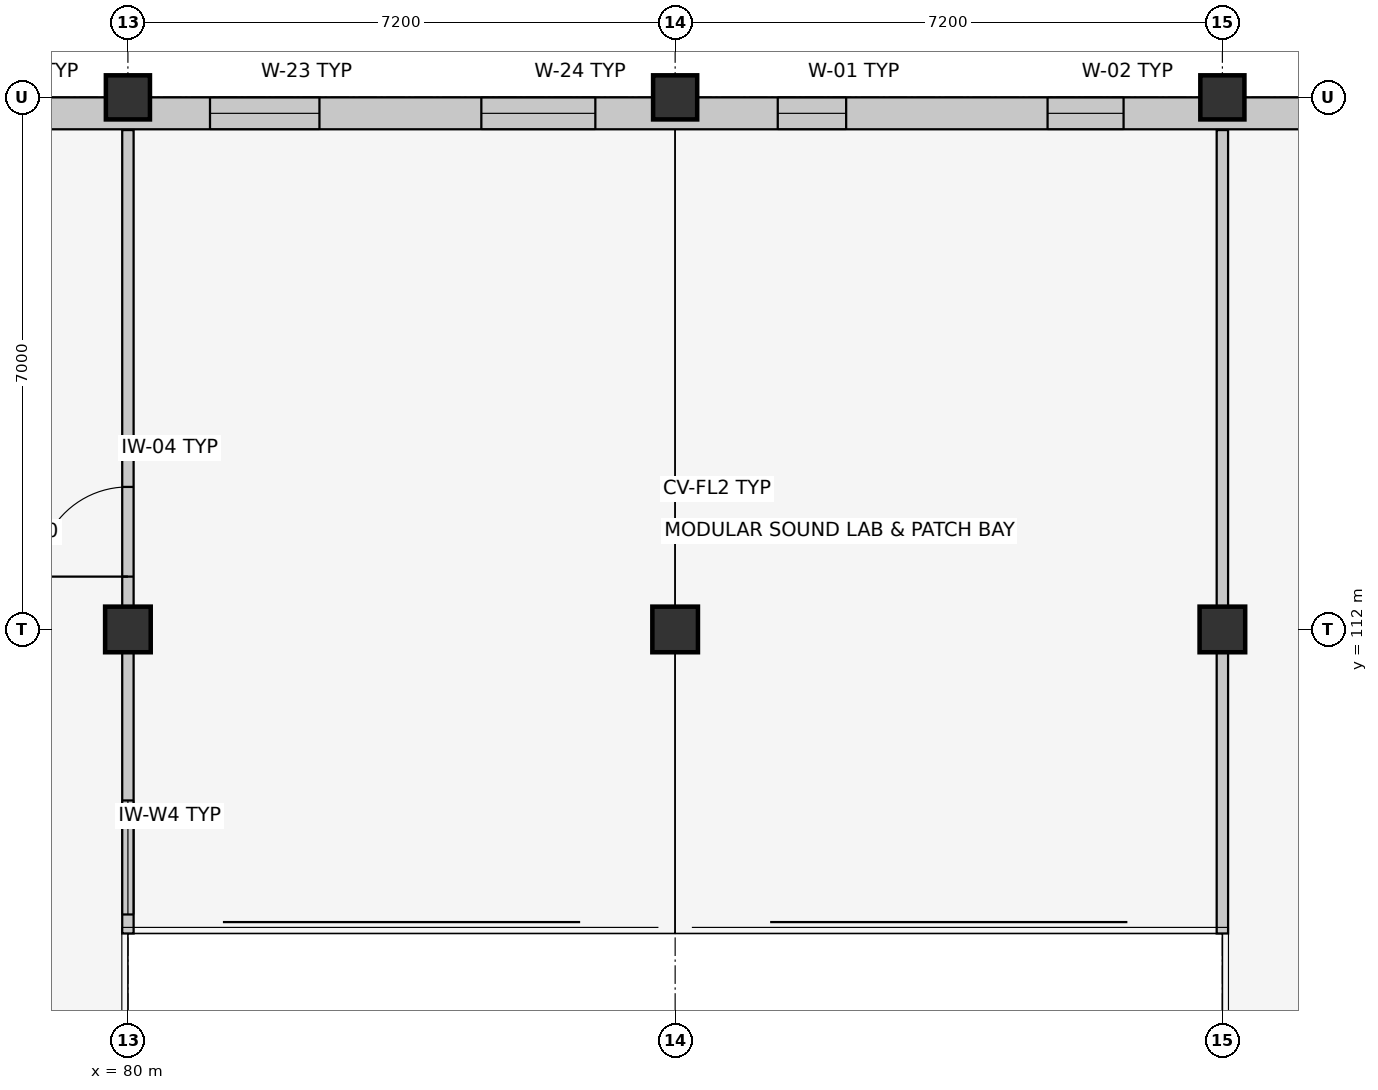
"""IFC4 building model, lengths in metres.
Left out: names, types, materials, properties, quantities, classifications, styles, units other than length and angle.
Written with IfcOpenShell. Run it as: python <this file> out.ifc"""

import sys

from ifc_helpers import new_model, si_unit, direction, frame, frame_2d, origin, origin_2d, place, context, subcontext, project, spatial, rectangle, extrude, element, fill, save


model = new_model("IFC4")
c1 = context("Model", 3, precision=1e-05, world=origin(), true_north=direction((0.0, 1.0)))
c2 = subcontext(c1, "Body", "Model", "MODEL_VIEW")
j1 = project(units=[si_unit("LENGTHUNIT", "METRE"), si_unit("PLANEANGLEUNIT", "RADIAN")], contexts=[c1])
p1 = place(None, origin())
s1 = spatial("IfcSite", under=j1, at=p1, CompositionType="ELEMENT")
p2 = place(p1, origin())
s2 = spatial("IfcBuilding", under=s1, at=p2, CompositionType="ELEMENT")
p3 = place(p2, frame((0.0, 0.0, 9.6)))
s3 = spatial("IfcBuildingStorey", under=s2, at=p3, CompositionType="ELEMENT", Elevation=9.6)
p4 = place(p3, frame((80.0, 112.0, 0.0), z_axis=(0.0, 0.0, 1.0), x_axis=(1.0, 0.0, 0.0)))
e1 = element("IfcColumn", 1, at=p4, inside=s3, PredefinedType="COLUMN", context=c2, shape_type="SweptSolid", body=[
    extrude(rectangle(XDim=0.6, YDim=0.6, at=origin_2d()), origin(), (0.0, 0.0, 1.0), 4.2),
])
p5 = place(p3, frame((80.0, 119.0, 0.0), z_axis=(0.0, 0.0, 1.0), x_axis=(1.0, 0.0, 0.0)))
e2 = element("IfcColumn", 2, at=p5, inside=s3, PredefinedType="COLUMN", context=c2, shape_type="SweptSolid", body=[
    extrude(rectangle(XDim=0.58, YDim=0.58, at=origin_2d()), origin(), (0.0, 0.0, 1.0), 4.2),
])
p6 = place(p3, frame((87.2, 112.0, 0.0), z_axis=(0.0, 0.0, 1.0), x_axis=(1.0, 0.0, 0.0)))
e3 = element("IfcColumn", 3, at=p6, inside=s3, PredefinedType="COLUMN", context=c2, shape_type="SweptSolid", body=[
    extrude(rectangle(XDim=0.6, YDim=0.6, at=origin_2d()), origin(), (0.0, 0.0, 1.0), 4.2),
])
p7 = place(p3, frame((87.2, 119.0, 0.0), z_axis=(0.0, 0.0, 1.0), x_axis=(1.0, 0.0, 0.0)))
e4 = element("IfcColumn", 4, at=p7, inside=s3, PredefinedType="COLUMN", context=c2, shape_type="SweptSolid", body=[
    extrude(rectangle(XDim=0.58, YDim=0.58, at=origin_2d()), origin(), (0.0, 0.0, 1.0), 4.2),
])
p8 = place(p3, frame((94.4, 112.0, 0.0), z_axis=(0.0, 0.0, 1.0), x_axis=(1.0, 0.0, 0.0)))
e5 = element("IfcColumn", 5, at=p8, inside=s3, PredefinedType="COLUMN", context=c2, shape_type="SweptSolid", body=[
    extrude(rectangle(XDim=0.6, YDim=0.6, at=origin_2d()), origin(), (0.0, 0.0, 1.0), 4.2),
])
p9 = place(p3, frame((94.4, 119.0, 0.0), z_axis=(0.0, 0.0, 1.0), x_axis=(1.0, 0.0, 0.0)))
e6 = element("IfcColumn", 6, at=p9, inside=s3, PredefinedType="COLUMN", context=c2, shape_type="SweptSolid", body=[
    extrude(rectangle(XDim=0.58, YDim=0.58, at=origin_2d()), origin(), (0.0, 0.0, 1.0), 4.2),
])
p10 = place(p3, frame((65.6, 118.79, 0.0), z_axis=(0.0, 0.0, 1.0), x_axis=(1.0, 0.0, 0.0)))
e7 = element("IfcWall", 7, at=p10, inside=s3, PredefinedType="SOLIDWALL", context=c2, shape_type="SweptSolid", body=[
    extrude(rectangle(XDim=43.2, YDim=0.42, at=frame_2d((21.6, 0.0))), origin(), (0.0, 0.0, 1.0), 3.245),
])
p11 = place(p10, frame((1.3, 0.0, 0.9)))
e8 = element("IfcOpeningElement", 8, at=p11, cuts=e7, PredefinedType="OPENING", context=c2, shape_type="SweptSolid", body=[
    extrude(rectangle(XDim=1.0, YDim=1.75, at=frame_2d((0.5, 0.875))), frame((0.0, 0.222, 0.0), z_axis=(0.0, -1.0, 0.0), x_axis=(1.0, 0.0, 0.0)), (0.0, 0.0, 1.0), 0.444),
])
p12 = place(p10, frame((4.84, 0.0, 0.9)))
e9 = element("IfcOpeningElement", 9, at=p12, cuts=e7, PredefinedType="OPENING", context=c2, shape_type="SweptSolid", body=[
    extrude(rectangle(XDim=1.12, YDim=1.75, at=frame_2d((0.56, 0.875))), frame((0.0, 0.222, 0.0), z_axis=(0.0, -1.0, 0.0), x_axis=(1.0, 0.0, 0.0)), (0.0, 0.0, 1.0), 0.444),
])
p13 = place(p10, frame((8.38, 0.0, 0.9)))
e10 = element("IfcOpeningElement", 10, at=p13, cuts=e7, PredefinedType="OPENING", context=c2, shape_type="SweptSolid", body=[
    extrude(rectangle(XDim=1.24, YDim=1.75, at=frame_2d((0.62, 0.875))), frame((0.0, 0.222, 0.0), z_axis=(0.0, -1.0, 0.0), x_axis=(1.0, 0.0, 0.0)), (0.0, 0.0, 1.0), 0.444),
])
p14 = place(p10, frame((11.93, 0.0, 0.9)))
e11 = element("IfcOpeningElement", 11, at=p14, cuts=e7, PredefinedType="OPENING", context=c2, shape_type="SweptSolid", body=[
    extrude(rectangle(XDim=1.34, YDim=1.75, at=frame_2d((0.67, 0.875))), frame((0.0, 0.222, 0.0), z_axis=(0.0, -1.0, 0.0), x_axis=(1.0, 0.0, 0.0)), (0.0, 0.0, 1.0), 0.444),
])
p15 = place(p10, frame((15.48, 0.0, 0.9)))
e12 = element("IfcOpeningElement", 12, at=p15, cuts=e7, PredefinedType="OPENING", context=c2, shape_type="SweptSolid", body=[
    extrude(rectangle(XDim=1.44, YDim=1.75, at=frame_2d((0.72, 0.875))), frame((0.0, 0.222, 0.0), z_axis=(0.0, -1.0, 0.0), x_axis=(1.0, 0.0, 0.0)), (0.0, 0.0, 1.0), 0.444),
])
p16 = place(p10, frame((19.05, 0.0, 0.9)))
e13 = element("IfcOpeningElement", 13, at=p16, cuts=e7, PredefinedType="OPENING", context=c2, shape_type="SweptSolid", body=[
    extrude(rectangle(XDim=1.5, YDim=1.75, at=frame_2d((0.75, 0.875))), frame((0.0, 0.222, 0.0), z_axis=(0.0, -1.0, 0.0), x_axis=(1.0, 0.0, 0.0)), (0.0, 0.0, 1.0), 0.444),
])
p17 = place(p10, frame((22.95, 0.0, 0.9)))
e14 = element("IfcOpeningElement", 14, at=p17, cuts=e7, PredefinedType="OPENING", context=c2, shape_type="SweptSolid", body=[
    extrude(rectangle(XDim=0.9, YDim=1.35, at=frame_2d((0.45, 0.675))), frame((0.0, 0.222, 0.0), z_axis=(0.0, -1.0, 0.0), x_axis=(1.0, 0.0, 0.0)), (0.0, 0.0, 1.0), 0.444),
])
p18 = place(p10, frame((26.5, 0.0, 0.9)))
e15 = element("IfcOpeningElement", 15, at=p18, cuts=e7, PredefinedType="OPENING", context=c2, shape_type="SweptSolid", body=[
    extrude(rectangle(XDim=1.0, YDim=1.35, at=frame_2d((0.5, 0.675))), frame((0.0, 0.222, 0.0), z_axis=(0.0, -1.0, 0.0), x_axis=(1.0, 0.0, 0.0)), (0.0, 0.0, 1.0), 0.444),
])
p19 = place(p10, frame((30.05, 0.0, 0.9)))
e16 = element("IfcOpeningElement", 16, at=p19, cuts=e7, PredefinedType="OPENING", context=c2, shape_type="SweptSolid", body=[
    extrude(rectangle(XDim=1.1, YDim=1.35, at=frame_2d((0.55, 0.675))), frame((0.0, 0.222, 0.0), z_axis=(0.0, -1.0, 0.0), x_axis=(1.0, 0.0, 0.0)), (0.0, 0.0, 1.0), 0.444),
])
p20 = place(p10, frame((33.6, 0.0, 0.9)))
e17 = element("IfcOpeningElement", 17, at=p20, cuts=e7, PredefinedType="OPENING", context=c2, shape_type="SweptSolid", body=[
    extrude(rectangle(XDim=1.2, YDim=1.35, at=frame_2d((0.6, 0.675))), frame((0.0, 0.222, 0.0), z_axis=(0.0, -1.0, 0.0), x_axis=(1.0, 0.0, 0.0)), (0.0, 0.0, 1.0), 0.444),
])
p21 = place(p10, frame((37.15, 0.0, 0.9)))
e18 = element("IfcOpeningElement", 18, at=p21, cuts=e7, PredefinedType="OPENING", context=c2, shape_type="SweptSolid", body=[
    extrude(rectangle(XDim=1.3, YDim=1.35, at=frame_2d((0.65, 0.675))), frame((0.0, 0.222, 0.0), z_axis=(0.0, -1.0, 0.0), x_axis=(1.0, 0.0, 0.0)), (0.0, 0.0, 1.0), 0.444),
])
p22 = place(p10, frame((40.7, 0.0, 0.9)))
e19 = element("IfcOpeningElement", 19, at=p22, cuts=e7, PredefinedType="OPENING", context=c2, shape_type="SweptSolid", body=[
    extrude(rectangle(XDim=1.4, YDim=1.35, at=frame_2d((0.7, 0.675))), frame((0.0, 0.222, 0.0), z_axis=(0.0, -1.0, 0.0), x_axis=(1.0, 0.0, 0.0)), (0.0, 0.0, 1.0), 0.444),
])
p23 = place(p3, frame((80.0, 108.0, 0.0), z_axis=(0.0, 0.0, 1.0), x_axis=(0.0, 1.0, 0.0)))
e20 = element("IfcWall", 20, at=p23, inside=s3, PredefinedType="PARTITIONING", context=c2, shape_type="SweptSolid", body=[
    extrude(rectangle(XDim=10.57, YDim=0.15, at=frame_2d((5.285, 0.0))), origin(), (0.0, 0.0, 1.0), 3.295),
])
p24 = place(p23, frame((4.695, 0.0, 0.0)))
e21 = element("IfcOpeningElement", 21, at=p24, cuts=e20, PredefinedType="OPENING", context=c2, shape_type="SweptSolid", body=[
    extrude(rectangle(XDim=1.18, YDim=2.2, at=frame_2d((0.59, 1.1))), frame((0.0, 0.087, 0.0), z_axis=(0.0, -1.0, 0.0), x_axis=(1.0, 0.0, 0.0)), (0.0, 0.0, 1.0), 0.174),
])
p25 = place(p23, frame((0.25, 0.0, 1.0)))
e22 = element("IfcOpeningElement", 22, at=p25, cuts=e20, PredefinedType="OPENING", context=c2, shape_type="SweptSolid", body=[
    extrude(rectangle(XDim=1.5, YDim=1.2, at=frame_2d((0.75, 0.6))), frame((0.0, 0.087, 0.0), z_axis=(0.0, -1.0, 0.0), x_axis=(1.0, 0.0, 0.0)), (0.0, 0.0, 1.0), 0.174),
])
p26 = place(p3, frame((94.4, 108.0, 0.0), z_axis=(0.0, 0.0, 1.0), x_axis=(0.0, 1.0, 0.0)))
e23 = element("IfcWall", 23, at=p26, inside=s3, PredefinedType="PARTITIONING", context=c2, shape_type="SweptSolid", body=[
    extrude(rectangle(XDim=10.57, YDim=0.15, at=frame_2d((5.285, 0.0))), origin(), (0.0, 0.0, 1.0), 3.295),
])
p27 = place(p15, origin())
e24 = element("IfcWindow", 24, at=p27, inside=s3, PartitioningType="SINGLE_PANEL", PredefinedType="WINDOW", context=c2, shape_type="SweptSolid", body=[
    extrude(rectangle(XDim=1.44, YDim=1.75, at=frame_2d((0.72, 0.875))), frame((0.0, 0.03, 0.0), z_axis=(0.0, -1.0, 0.0), x_axis=(1.0, 0.0, 0.0)), (0.0, 0.0, 1.0), 0.06),
])
fill(e12, e24)
p28 = place(p16, origin())
e25 = element("IfcWindow", 25, at=p28, inside=s3, PartitioningType="SINGLE_PANEL", PredefinedType="WINDOW", context=c2, shape_type="SweptSolid", body=[
    extrude(rectangle(XDim=1.5, YDim=1.75, at=frame_2d((0.75, 0.875))), frame((0.0, 0.03, 0.0), z_axis=(0.0, -1.0, 0.0), x_axis=(1.0, 0.0, 0.0)), (0.0, 0.0, 1.0), 0.06),
])
fill(e13, e25)
p29 = place(p17, origin())
e26 = element("IfcWindow", 26, at=p29, inside=s3, PartitioningType="SINGLE_PANEL", PredefinedType="WINDOW", context=c2, shape_type="SweptSolid", body=[
    extrude(rectangle(XDim=0.9, YDim=1.35, at=frame_2d((0.45, 0.675))), frame((0.0, 0.03, 0.0), z_axis=(0.0, -1.0, 0.0), x_axis=(1.0, 0.0, 0.0)), (0.0, 0.0, 1.0), 0.06),
])
fill(e14, e26)
p30 = place(p18, origin())
e27 = element("IfcWindow", 27, at=p30, inside=s3, PartitioningType="SINGLE_PANEL", PredefinedType="WINDOW", context=c2, shape_type="SweptSolid", body=[
    extrude(rectangle(XDim=1.0, YDim=1.35, at=frame_2d((0.5, 0.675))), frame((0.0, 0.03, 0.0), z_axis=(0.0, -1.0, 0.0), x_axis=(1.0, 0.0, 0.0)), (0.0, 0.0, 1.0), 0.06),
])
fill(e15, e27)
p31 = place(p24, origin())
e28 = element("IfcDoor", 28, at=p31, inside=s3, OperationType="SINGLE_SWING_LEFT", PredefinedType="DOOR", context=c2, shape_type="SweptSolid", body=[
    extrude(rectangle(XDim=1.18, YDim=2.2, at=frame_2d((0.59, 1.1))), frame((0.0, 0.025, 0.0), z_axis=(0.0, -1.0, 0.0), x_axis=(1.0, 0.0, 0.0)), (0.0, 0.0, 1.0), 0.05),
])
fill(e21, e28)
p32 = place(p25, origin())
e29 = element("IfcWindow", 29, at=p32, inside=s3, PartitioningType="SINGLE_PANEL", PredefinedType="WINDOW", context=c2, shape_type="SweptSolid", body=[
    extrude(rectangle(XDim=1.5, YDim=1.2, at=frame_2d((0.75, 0.6))), frame((0.0, 0.03, 0.0), z_axis=(0.0, -1.0, 0.0), x_axis=(1.0, 0.0, 0.0)), (0.0, 0.0, 1.0), 0.06),
])
fill(e22, e29)
save(model, sys.argv[1])
